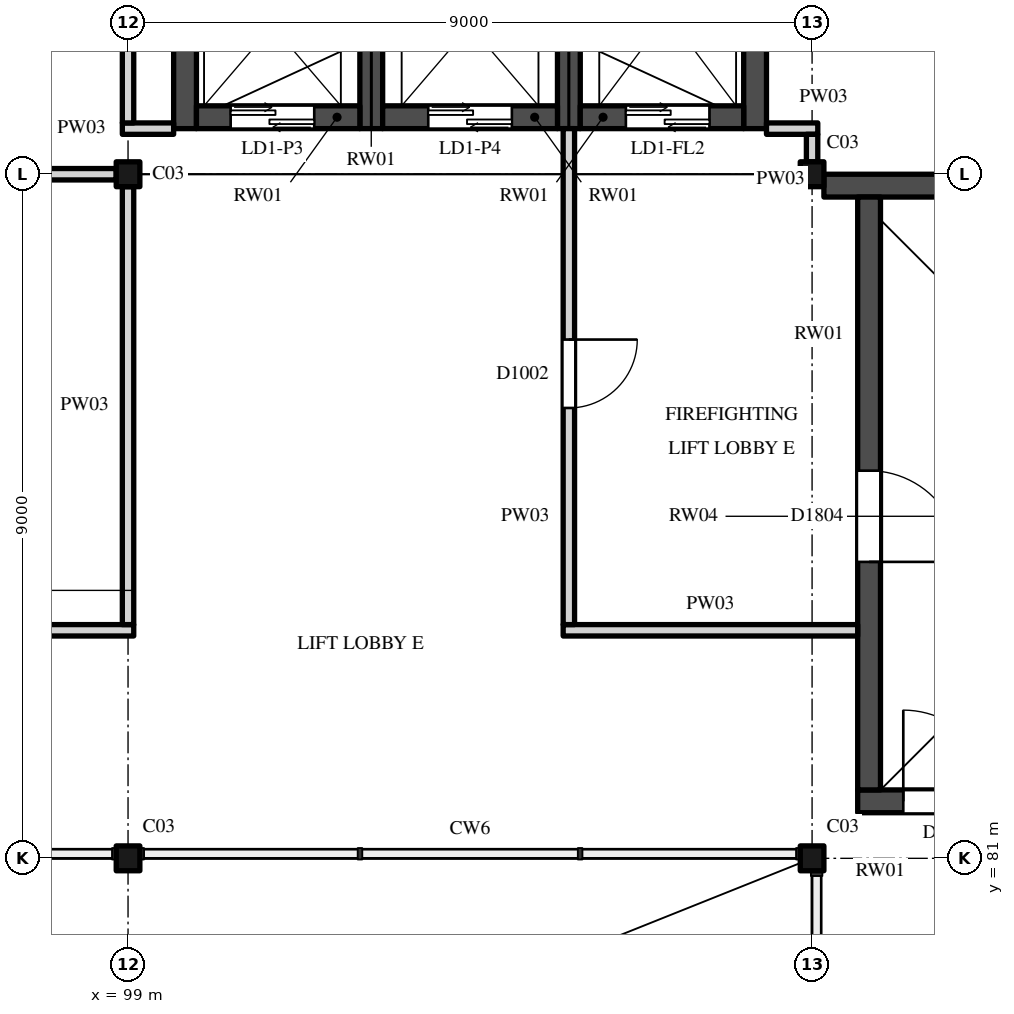
"""IFC4 building model, lengths in metres.
Left out: names, types, materials, properties, quantities, classifications, styles, units other than length and angle.
Written with IfcOpenShell. Run it as: python <this file> out.ifc"""

import sys

from ifc_helpers import new_model, si_unit, direction, frame, frame_2d, origin, origin_2d, place, context, subcontext, project, spatial, rectangle, i_section, extrude, element, fill, save


model = new_model("IFC4")
c1 = context("Model", 3, precision=1e-05, world=origin(), true_north=direction((0.0, 1.0)))
c2 = subcontext(c1, "Body", "Model", "MODEL_VIEW")
j1 = project(units=[si_unit("LENGTHUNIT", "METRE"), si_unit("PLANEANGLEUNIT", "RADIAN")], contexts=[c1])
p1 = place(None, origin())
s1 = spatial("IfcSite", under=j1, at=p1, CompositionType="ELEMENT")
p2 = place(p1, origin())
s2 = spatial("IfcBuilding", under=s1, at=p2, CompositionType="ELEMENT")
p3 = place(p2, frame((0.0, 0.0, 6.0)))
s3 = spatial("IfcBuildingStorey", under=s2, at=p3, CompositionType="ELEMENT", Elevation=6.0)
for number, where, z_axis, x_axis in (
    (1, (99.0, 81.0, 0.0), (0.0, 0.0, 1.0), (1.0, 0.0, 0.0)),
    (2, (108.0, 81.0, 0.0), (0.0, 0.0, 1.0), (1.0, 0.0, 0.0)),
    (3, (99.0, 90.0, 0.0), (0.0, 0.0, 1.0), (1.0, 0.0, 0.0)),
    (4, (108.0, 90.0, 0.0), (0.0, 0.0, 1.0), (1.0, 0.0, 0.0)),
):
    element("IfcColumn", number, at=place(p3, frame(where, z_axis=z_axis, x_axis=x_axis)), inside=s3, PredefinedType="COLUMN", context=c2, shape_type="SweptSolid", body=[
        extrude(i_section(OverallWidth=0.311, OverallDepth=0.327, WebThickness=0.016, FlangeThickness=0.025, FilletRadius=0.017, at=origin_2d()), origin(), (0.0, 0.0, 1.0), 5.0),
    ])
p4 = place(p3, frame((108.6, 81.75, 0.0), z_axis=(0.0, 0.0, 1.0), x_axis=(1.0, 0.0, 0.0)))
e5 = element("IfcWall", 5, at=p4, inside=s3, PredefinedType="SHEAR", context=c2, shape_type="SweptSolid", body=[
    extrude(rectangle(XDim=8.1, YDim=0.3, at=frame_2d((4.05, 0.0))), origin(), (0.0, 0.0, 1.0), 5.0),
])
p5 = place(p4, frame((0.6, 0.0, 0.0)))
e6 = element("IfcOpeningElement", 6, at=p5, cuts=e5, PredefinedType="OPENING", context=c2, shape_type="SweptSolid", body=[
    extrude(rectangle(XDim=1.2, YDim=2.1, at=frame_2d((0.6, 1.05))), frame((0.0, 0.16, 0.0), z_axis=(0.0, -1.0, 0.0), x_axis=(1.0, 0.0, 0.0)), (0.0, 0.0, 1.0), 0.32),
])
p6 = place(p3, frame((108.156, 89.85, 0.0), z_axis=(0.0, 0.0, 1.0), x_axis=(1.0, 0.0, 0.0)))
e7 = element("IfcWall", 7, at=p6, inside=s3, PredefinedType="SHEAR", context=c2, shape_type="SweptSolid", body=[
    extrude(rectangle(XDim=8.544, YDim=0.3, at=frame_2d((4.272, 0.0))), origin(), (0.0, 0.0, 1.0), 5.0),
])
p7 = place(p3, frame((108.75, 81.9, 0.0), z_axis=(0.0, 0.0, 1.0), x_axis=(0.0, 1.0, 0.0)))
e8 = element("IfcWall", 8, at=p7, inside=s3, PredefinedType="SHEAR", context=c2, shape_type="SweptSolid", body=[
    extrude(rectangle(XDim=7.8, YDim=0.3, at=frame_2d((3.9, 0.0))), origin(), (0.0, 0.0, 1.0), 5.0),
])
p8 = place(p7, frame((3.0, 0.0, 0.0)))
e9 = element("IfcOpeningElement", 9, at=p8, cuts=e8, PredefinedType="OPENING", context=c2, shape_type="SweptSolid", body=[
    extrude(rectangle(XDim=1.2, YDim=2.1, at=frame_2d((0.6, 1.05))), frame((0.0, 0.16, 0.0), z_axis=(0.0, -1.0, 0.0), x_axis=(1.0, 0.0, 0.0)), (0.0, 0.0, 1.0), 0.32),
])
for number, where, z_axis, x_axis in (
    (10, (99.75, 90.6, 0.0), (0.0, 0.0, 1.0), (0.0, 1.0, 0.0)),
    (11, (102.2, 90.6, 0.0), (0.0, 0.0, 1.0), (0.0, 1.0, 0.0)),
    (12, (104.8, 90.6, 0.0), (0.0, 0.0, 1.0), (0.0, 1.0, 0.0)),
    (13, (107.25, 90.6, 0.0), (0.0, 0.0, 1.0), (0.0, 1.0, 0.0)),
):
    element("IfcWall", number, at=place(p3, frame(where, z_axis=z_axis, x_axis=x_axis)), inside=s3, PredefinedType="SHEAR", context=c2, shape_type="SweptSolid", body=[
        extrude(rectangle(XDim=3.6, YDim=0.3, at=frame_2d((1.8, 0.0))), origin(), (0.0, 0.0, 1.0), 5.0),
    ])
p9 = place(p3, frame((99.9, 90.75, 0.0), z_axis=(0.0, 0.0, 1.0), x_axis=(1.0, 0.0, 0.0)))
e14 = element("IfcWall", 14, at=p9, inside=s3, PredefinedType="SHEAR", context=c2, shape_type="SweptSolid", body=[
    extrude(rectangle(XDim=2.15, YDim=0.3, at=frame_2d((1.075, 0.0))), origin(), (0.0, 0.0, 1.0), 5.0),
])
p10 = place(p9, frame((0.45, 0.0, 0.0)))
e15 = element("IfcOpeningElement", 15, at=p10, cuts=e14, PredefinedType="OPENING", context=c2, shape_type="SweptSolid", body=[
    extrude(rectangle(XDim=1.1, YDim=2.1, at=frame_2d((0.55, 1.05))), frame((0.0, 0.16, 0.0), z_axis=(0.0, -1.0, 0.0), x_axis=(1.0, 0.0, 0.0)), (0.0, 0.0, 1.0), 0.32),
])
p11 = place(p3, frame((102.35, 90.75, 0.0), z_axis=(0.0, 0.0, 1.0), x_axis=(1.0, 0.0, 0.0)))
e16 = element("IfcWall", 16, at=p11, inside=s3, PredefinedType="SHEAR", context=c2, shape_type="SweptSolid", body=[
    extrude(rectangle(XDim=2.3, YDim=0.3, at=frame_2d((1.15, 0.0))), origin(), (0.0, 0.0, 1.0), 5.0),
])
p12 = place(p11, frame((0.6, 0.0, 0.0)))
e17 = element("IfcOpeningElement", 17, at=p12, cuts=e16, PredefinedType="OPENING", context=c2, shape_type="SweptSolid", body=[
    extrude(rectangle(XDim=1.1, YDim=2.1, at=frame_2d((0.55, 1.05))), frame((0.0, 0.16, 0.0), z_axis=(0.0, -1.0, 0.0), x_axis=(1.0, 0.0, 0.0)), (0.0, 0.0, 1.0), 0.32),
])
p13 = place(p3, frame((104.95, 90.75, 0.0), z_axis=(0.0, 0.0, 1.0), x_axis=(1.0, 0.0, 0.0)))
e18 = element("IfcWall", 18, at=p13, inside=s3, PredefinedType="SHEAR", context=c2, shape_type="SweptSolid", body=[
    extrude(rectangle(XDim=2.15, YDim=0.3, at=frame_2d((1.075, 0.0))), origin(), (0.0, 0.0, 1.0), 5.0),
])
p14 = place(p13, frame((0.6, 0.0, 0.0)))
e19 = element("IfcOpeningElement", 19, at=p14, cuts=e18, PredefinedType="OPENING", context=c2, shape_type="SweptSolid", body=[
    extrude(rectangle(XDim=1.1, YDim=2.1, at=frame_2d((0.55, 1.05))), frame((0.0, 0.16, 0.0), z_axis=(0.0, -1.0, 0.0), x_axis=(1.0, 0.0, 0.0)), (0.0, 0.0, 1.0), 0.32),
])
p15 = place(p3, frame((71.925, 84.0, 0.0), z_axis=(0.0, 0.0, 1.0), x_axis=(1.0, 0.0, 0.0)))
e20 = element("IfcWall", 20, at=p15, inside=s3, PredefinedType="PARTITIONING", context=c2, shape_type="SweptSolid", body=[
    extrude(rectangle(XDim=27.15, YDim=0.15, at=frame_2d((13.575, 0.0))), origin(), (0.0, 0.0, 1.0), 4.473),
])
p16 = place(p15, frame((12.625, 0.0, 0.0)))
e21 = element("IfcOpeningElement", 21, at=p16, cuts=e20, PredefinedType="OPENING", context=c2, shape_type="SweptSolid", body=[
    extrude(rectangle(XDim=1.8, YDim=2.4, at=frame_2d((0.9, 1.2))), frame((0.0, 0.085, 0.0), z_axis=(0.0, -1.0, 0.0), x_axis=(1.0, 0.0, 0.0)), (0.0, 0.0, 1.0), 0.17),
])
p17 = place(p3, frame((104.725, 84.0, 0.0), z_axis=(0.0, 0.0, 1.0), x_axis=(1.0, 0.0, 0.0)))
e22 = element("IfcWall", 22, at=p17, inside=s3, PredefinedType="PARTITIONING", context=c2, shape_type="SweptSolid", body=[
    extrude(rectangle(XDim=3.875, YDim=0.15, at=frame_2d((1.938, 0.0))), origin(), (0.0, 0.0, 1.0), 4.473),
])
p18 = place(p3, frame((90.156, 90.0, 0.0), z_axis=(0.0, 0.0, 1.0), x_axis=(1.0, 0.0, 0.0)))
e23 = element("IfcWall", 23, at=p18, inside=s3, PredefinedType="PARTITIONING", context=c2, shape_type="SweptSolid", body=[
    extrude(rectangle(XDim=8.689, YDim=0.15, at=frame_2d((4.344, 0.0))), origin(), (0.0, 0.0, 1.0), 4.466),
])
for number, where, z_axis, x_axis in (
    (24, (98.925, 90.6, 0.0), (0.0, 0.0, 1.0), (1.0, 0.0, 0.0)),
    (25, (107.4, 90.6, 0.0), (0.0, 0.0, 1.0), (1.0, 0.0, 0.0)),
):
    element("IfcWall", number, at=place(p3, frame(where, z_axis=z_axis, x_axis=x_axis)), inside=s3, PredefinedType="PARTITIONING", context=c2, shape_type="SweptSolid", body=[
        extrude(rectangle(XDim=0.675, YDim=0.15, at=frame_2d((0.337, 0.0))), origin(), (0.0, 0.0, 1.0), 4.825),
    ])
p19 = place(p3, frame((99.0, 84.075, 0.0), z_axis=(0.0, 0.0, 1.0), x_axis=(0.0, 1.0, 0.0)))
e26 = element("IfcWall", 26, at=p19, inside=s3, PredefinedType="PARTITIONING", context=c2, shape_type="SweptSolid", body=[
    extrude(rectangle(XDim=5.761, YDim=0.15, at=frame_2d((2.881, 0.0))), origin(), (0.0, 0.0, 1.0), 4.365),
])
p20 = place(p3, frame((99.0, 90.675, 0.0), z_axis=(0.0, 0.0, 1.0), x_axis=(0.0, 1.0, 0.0)))
e27 = element("IfcWall", 27, at=p20, inside=s3, PredefinedType="PARTITIONING", context=c2, shape_type="SweptSolid", body=[
    extrude(rectangle(XDim=8.165, YDim=0.15, at=frame_2d((4.082, 0.0))), origin(), (0.0, 0.0, 1.0), 4.365),
])
p21 = place(p3, frame((104.8, 84.075, 0.0), z_axis=(0.0, 0.0, 1.0), x_axis=(0.0, 1.0, 0.0)))
e28 = element("IfcWall", 28, at=p21, inside=s3, PredefinedType="PARTITIONING", context=c2, shape_type="SweptSolid", body=[
    extrude(rectangle(XDim=6.525, YDim=0.15, at=frame_2d((3.263, 0.0))), origin(), (0.0, 0.0, 1.0), 4.825),
])
p22 = place(p21, frame((2.85, 0.0, 0.0)))
e29 = element("IfcOpeningElement", 29, at=p22, cuts=e28, PredefinedType="OPENING", context=c2, shape_type="SweptSolid", body=[
    extrude(rectangle(XDim=0.9, YDim=2.1, at=frame_2d((0.45, 1.05))), frame((0.0, 0.085, 0.0), z_axis=(0.0, -1.0, 0.0), x_axis=(1.0, 0.0, 0.0)), (0.0, 0.0, 1.0), 0.17),
])
p23 = place(p3, frame((108.0, 90.164, 0.0), z_axis=(0.0, 0.0, 1.0), x_axis=(0.0, 1.0, 0.0)))
e30 = element("IfcWall", 30, at=p23, inside=s3, PredefinedType="PARTITIONING", context=c2, shape_type="SweptSolid", body=[
    extrude(rectangle(XDim=0.361, YDim=0.15, at=frame_2d((0.181, 0.0))), origin(), (0.0, 0.0, 1.0), 4.825),
])
p24 = place(p8, origin())
e31 = element("IfcDoor", 31, at=p24, inside=s3, OperationType="SINGLE_SWING_LEFT", PredefinedType="DOOR", context=c2, shape_type="SweptSolid", body=[
    extrude(rectangle(XDim=1.2, YDim=2.1, at=frame_2d((0.6, 1.05))), frame((0.0, 0.025, 0.0), z_axis=(0.0, -1.0, 0.0), x_axis=(1.0, 0.0, 0.0)), (0.0, 0.0, 1.0), 0.05),
])
fill(e9, e31)
p25 = place(p5, origin())
e32 = element("IfcDoor", 32, at=p25, inside=s3, OperationType="SINGLE_SWING_RIGHT", PredefinedType="DOOR", context=c2, shape_type="SweptSolid", body=[
    extrude(rectangle(XDim=1.2, YDim=2.1, at=frame_2d((0.6, 1.05))), frame((0.0, 0.025, 0.0), z_axis=(0.0, -1.0, 0.0), x_axis=(1.0, 0.0, 0.0)), (0.0, 0.0, 1.0), 0.05),
])
fill(e6, e32)
p26 = place(p10, origin())
e33 = element("IfcDoor", 33, at=p26, inside=s3, OperationType="DOUBLE_DOOR_SLIDING", PredefinedType="DOOR", context=c2, shape_type="SweptSolid", body=[
    extrude(rectangle(XDim=1.1, YDim=2.1, at=frame_2d((0.55, 1.05))), frame((0.0, 0.025, 0.0), z_axis=(0.0, -1.0, 0.0), x_axis=(1.0, 0.0, 0.0)), (0.0, 0.0, 1.0), 0.05),
])
fill(e15, e33)
p27 = place(p12, origin())
e34 = element("IfcDoor", 34, at=p27, inside=s3, OperationType="DOUBLE_DOOR_SLIDING", PredefinedType="DOOR", context=c2, shape_type="SweptSolid", body=[
    extrude(rectangle(XDim=1.1, YDim=2.1, at=frame_2d((0.55, 1.05))), frame((0.0, 0.025, 0.0), z_axis=(0.0, -1.0, 0.0), x_axis=(1.0, 0.0, 0.0)), (0.0, 0.0, 1.0), 0.05),
])
fill(e17, e34)
p28 = place(p14, origin())
e35 = element("IfcDoor", 35, at=p28, inside=s3, OperationType="DOUBLE_DOOR_SLIDING", PredefinedType="DOOR", context=c2, shape_type="SweptSolid", body=[
    extrude(rectangle(XDim=1.1, YDim=2.1, at=frame_2d((0.55, 1.05))), frame((0.0, 0.025, 0.0), z_axis=(0.0, -1.0, 0.0), x_axis=(1.0, 0.0, 0.0)), (0.0, 0.0, 1.0), 0.05),
])
fill(e19, e35)
p29 = place(p22, origin())
e36 = element("IfcDoor", 36, at=p29, inside=s3, OperationType="SINGLE_SWING_RIGHT", PredefinedType="DOOR", context=c2, shape_type="SweptSolid", body=[
    extrude(rectangle(XDim=0.9, YDim=2.1, at=frame_2d((0.45, 1.05))), frame((0.0, 0.025, 0.0), z_axis=(0.0, -1.0, 0.0), x_axis=(1.0, 0.0, 0.0)), (0.0, 0.0, 1.0), 0.05),
])
fill(e29, e36)
save(model, sys.argv[1])
